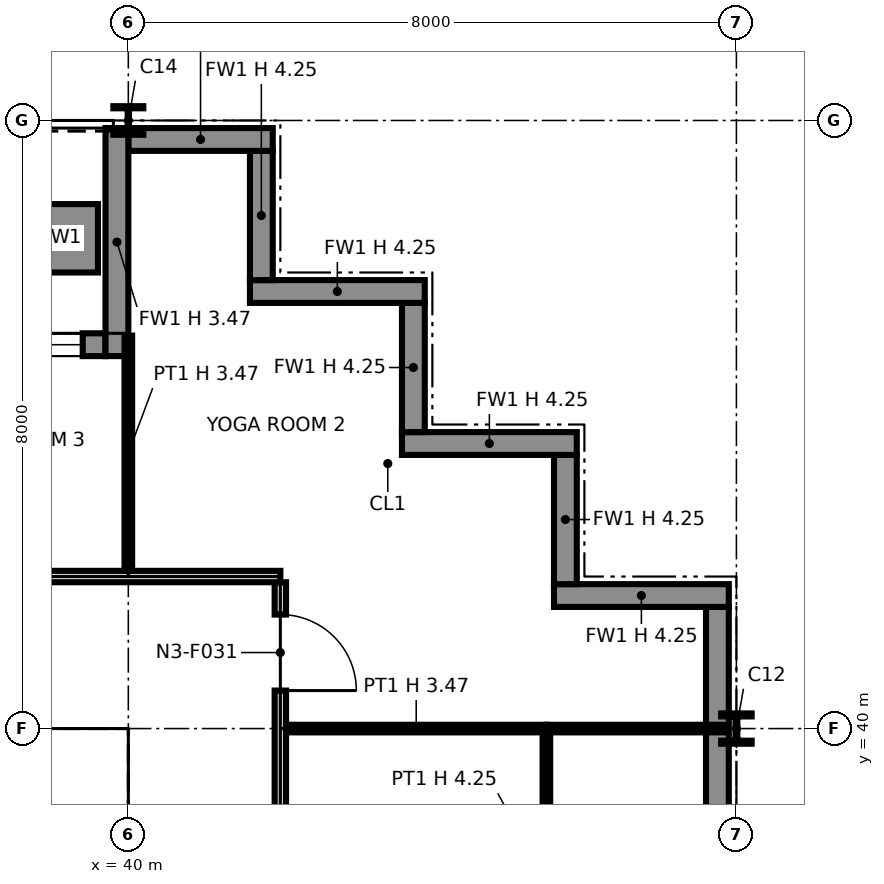
"""IFC4 building model, lengths in metres.
Left out: names, types, materials, properties, quantities, classifications, styles, units other than length and angle.
Written with IfcOpenShell. Run it as: python <this file> out.ifc"""

import sys

from ifc_helpers import new_model, si_unit, direction, frame, frame_2d, origin, origin_2d, place, context, subcontext, project, spatial, polyline, rectangle, i_section, outline, extrude, element, fill, save


model = new_model("IFC4")
c1 = context("Model", 3, precision=1e-05, world=origin(), true_north=direction((0.0, 1.0)))
c2 = subcontext(c1, "Body", "Model", "MODEL_VIEW")
j1 = project(units=[si_unit("LENGTHUNIT", "METRE"), si_unit("PLANEANGLEUNIT", "RADIAN")], contexts=[c1])
p1 = place(None, origin())
s1 = spatial("IfcSite", under=j1, at=p1, CompositionType="ELEMENT")
p2 = place(p1, origin())
s2 = spatial("IfcBuilding", under=s1, at=p2, CompositionType="ELEMENT")
p3 = place(p2, frame((0.0, 0.0, 65.6)))
s3 = spatial("IfcBuildingStorey", under=s2, at=p3, CompositionType="ELEMENT", Elevation=65.6)
p4 = place(p3, frame((40.0, 40.0, 0.0), z_axis=(0.0, 0.0, 1.0), x_axis=(1.0, 0.0, 0.0)))
e1 = element("IfcColumn", 1, at=p4, inside=s3, PredefinedType="COLUMN", context=c2, shape_type="SweptSolid", body=[
    extrude(i_section(OverallWidth=0.371, OverallDepth=0.361, WebThickness=0.012, FlangeThickness=0.02, at=origin_2d()), origin(), (0.0, 0.0, 1.0), 4.25),
])
p5 = place(p3, frame((40.0, 48.0, 0.0), z_axis=(0.0, 0.0, 1.0), x_axis=(1.0, 0.0, 0.0)))
e2 = element("IfcColumn", 2, at=p5, inside=s3, PredefinedType="COLUMN", context=c2, shape_type="SweptSolid", body=[
    extrude(i_section(OverallWidth=0.394, OverallDepth=0.376, WebThickness=0.017, FlangeThickness=0.028, at=origin_2d()), origin(), (0.0, 0.0, 1.0), 4.25),
])
p6 = place(p3, frame((48.0, 40.0, 0.0), z_axis=(0.0, 0.0, 1.0), x_axis=(1.0, 0.0, 0.0)))
e3 = element("IfcColumn", 3, at=p6, inside=s3, PredefinedType="COLUMN", context=c2, shape_type="SweptSolid", body=[
    extrude(i_section(OverallWidth=0.401, OverallDepth=0.399, WebThickness=0.025, FlangeThickness=0.04, at=origin_2d()), origin(), (0.0, 0.0, 1.0), 4.25),
])
p7 = place(p3, frame((47.75, 32.0, 0.0), z_axis=(0.0, 0.0, 1.0), x_axis=(0.0, 1.0, 0.0)))
e4 = element("IfcWall", 4, at=p7, inside=s3, PredefinedType="SOLIDWALL", context=c2, shape_type="SweptSolid", body=[
    extrude(rectangle(XDim=9.6, YDim=0.3, at=frame_2d((4.8, 0.0))), origin(), (0.0, 0.0, 1.0), 4.25),
])
p8 = place(p3, frame((47.9, 41.75, 0.0), z_axis=(0.0, 0.0, 1.0), x_axis=(-1.0, 0.0, 0.0)))
e5 = element("IfcWall", 5, at=p8, inside=s3, PredefinedType="SOLIDWALL", context=c2, shape_type="SweptSolid", body=[
    extrude(rectangle(XDim=2.3, YDim=0.3, at=frame_2d((1.15, 0.0))), origin(), (0.0, 0.0, 1.0), 4.25),
])
p9 = place(p3, frame((45.75, 41.9, 0.0), z_axis=(0.0, 0.0, 1.0), x_axis=(0.0, 1.0, 0.0)))
e6 = element("IfcWall", 6, at=p9, inside=s3, PredefinedType="SOLIDWALL", context=c2, shape_type="SweptSolid", body=[
    extrude(rectangle(XDim=1.7, YDim=0.3, at=frame_2d((0.85, 0.0))), origin(), (0.0, 0.0, 1.0), 4.25),
])
p10 = place(p3, frame((45.9, 43.75, 0.0), z_axis=(0.0, 0.0, 1.0), x_axis=(-1.0, 0.0, 0.0)))
e7 = element("IfcWall", 7, at=p10, inside=s3, PredefinedType="SOLIDWALL", context=c2, shape_type="SweptSolid", body=[
    extrude(rectangle(XDim=2.3, YDim=0.3, at=frame_2d((1.15, 0.0))), origin(), (0.0, 0.0, 1.0), 4.25),
])
p11 = place(p3, frame((43.75, 43.9, 0.0), z_axis=(0.0, 0.0, 1.0), x_axis=(0.0, 1.0, 0.0)))
e8 = element("IfcWall", 8, at=p11, inside=s3, PredefinedType="SOLIDWALL", context=c2, shape_type="SweptSolid", body=[
    extrude(rectangle(XDim=1.7, YDim=0.3, at=frame_2d((0.85, 0.0))), origin(), (0.0, 0.0, 1.0), 4.25),
])
p12 = place(p3, frame((43.9, 45.75, 0.0), z_axis=(0.0, 0.0, 1.0), x_axis=(-1.0, 0.0, 0.0)))
e9 = element("IfcWall", 9, at=p12, inside=s3, PredefinedType="SOLIDWALL", context=c2, shape_type="SweptSolid", body=[
    extrude(rectangle(XDim=2.3, YDim=0.3, at=frame_2d((1.15, 0.0))), origin(), (0.0, 0.0, 1.0), 4.25),
])
p13 = place(p3, frame((41.75, 45.9, 0.0), z_axis=(0.0, 0.0, 1.0), x_axis=(0.0, 1.0, 0.0)))
e10 = element("IfcWall", 10, at=p13, inside=s3, PredefinedType="SOLIDWALL", context=c2, shape_type="SweptSolid", body=[
    extrude(rectangle(XDim=1.7, YDim=0.3, at=frame_2d((0.85, 0.0))), origin(), (0.0, 0.0, 1.0), 4.25),
])
p14 = place(p3, frame((41.9, 47.75, 0.0), z_axis=(0.0, 0.0, 1.0), x_axis=(-1.0, 0.0, 0.0)))
e11 = element("IfcWall", 11, at=p14, inside=s3, PredefinedType="SOLIDWALL", context=c2, shape_type="SweptSolid", body=[
    extrude(rectangle(XDim=1.9, YDim=0.3, at=frame_2d((0.95, 0.0))), origin(), (0.0, 0.0, 1.0), 4.25),
])
p15 = place(p3, frame((39.7, 45.05, 0.0), z_axis=(0.0, 0.0, 1.0), x_axis=(-1.0, 0.0, 0.0)))
e12 = element("IfcWall", 12, at=p15, inside=s3, PredefinedType="SOLIDWALL", context=c2, shape_type="SweptSolid", body=[
    extrude(rectangle(XDim=7.4, YDim=0.3, at=frame_2d((3.7, 0.0))), origin(), (0.0, 0.0, 1.0), 4.25),
])
p16 = place(p15, frame((0.3, 0.0, 0.9)))
e13 = element("IfcOpeningElement", 13, at=p16, cuts=e12, PredefinedType="OPENING", context=c2, shape_type="SweptSolid", body=[
    extrude(rectangle(XDim=2.8, YDim=2.2, at=frame_2d((1.4, 1.1))), frame((0.0, 0.16, 0.0), z_axis=(0.0, -1.0, 0.0), x_axis=(1.0, 0.0, 0.0)), (0.0, 0.0, 1.0), 0.32),
])
p17 = place(p15, frame((4.7, 0.0, 0.0)))
e14 = element("IfcOpeningElement", 14, at=p17, cuts=e12, PredefinedType="OPENING", context=c2, shape_type="SweptSolid", body=[
    extrude(rectangle(XDim=2.0, YDim=2.4, at=frame_2d((1.0, 1.2))), frame((0.0, 0.16, 0.0), z_axis=(0.0, -1.0, 0.0), x_axis=(1.0, 0.0, 0.0)), (0.0, 0.0, 1.0), 0.32),
])
p18 = place(p3, frame((39.85, 47.9, 0.0), z_axis=(0.0, 0.0, 1.0), x_axis=(0.0, -1.0, 0.0)))
e15 = element("IfcWall", 15, at=p18, inside=s3, PredefinedType="SOLIDWALL", context=c2, shape_type="SweptSolid", body=[
    extrude(rectangle(XDim=3.0, YDim=0.3, at=frame_2d((1.5, 0.0))), origin(), (0.0, 0.0, 1.0), 3.469),
])
p19 = place(p3, frame((39.6, 46.45, 0.0), z_axis=(0.0, 0.0, 1.0), x_axis=(-1.0, 0.0, 0.0)))
e16 = element("IfcWall", 16, at=p19, inside=s3, PredefinedType="SOLIDWALL", context=c2, shape_type="SweptSolid", body=[
    extrude(rectangle(XDim=3.2, YDim=0.9, at=frame_2d((1.6, 0.0))), origin(), (0.0, 0.0, 1.0), 0.6),
])
p20 = place(p3, frame((24.65, 39.25, 0.0), z_axis=(0.0, 0.0, 1.0), x_axis=(1.0, 0.0, 0.0)))
e17 = element("IfcWall", 17, at=p20, inside=s3, PredefinedType="PARTITIONING", context=c2, shape_type="SweptSolid", body=[
    extrude(outline(polyline([(0.0, 0.0), (14.7, 0.0), (14.7, 4.25), (7.469, 4.25), (7.469, 3.632), (7.231, 3.632), (7.23, 4.25), (0.0, 4.25), (0.0, 0.0)])), frame((0.0, 0.1, 0.0), z_axis=(0.0, -1.0, 0.0), x_axis=(1.0, 0.0, 0.0)), (0.0, 0.0, 1.0), 0.2),
])
p21 = place(p3, frame((39.25, 32.85, 0.0), z_axis=(0.0, 0.0, 1.0), x_axis=(0.0, 1.0, 0.0)))
e18 = element("IfcWall", 18, at=p21, inside=s3, PredefinedType="PARTITIONING", context=c2, shape_type="SweptSolid", body=[
    extrude(rectangle(XDim=6.3, YDim=0.2, at=frame_2d((3.15, 0.0))), origin(), (0.0, 0.0, 1.0), 4.25),
])
p22 = place(p3, frame((42.0, 16.0, 0.0), z_axis=(0.0, 0.0, 1.0), x_axis=(0.0, 1.0, 0.0)))
e19 = element("IfcWall", 19, at=p22, inside=s3, PredefinedType="PARTITIONING", context=c2, shape_type="SweptSolid", body=[
    extrude(outline(polyline([(0.0, 0.0), (25.925, 0.0), (25.925, 4.25), (24.3, 4.25), (24.298, 3.47), (23.702, 3.47), (23.7, 4.25), (20.3, 4.25), (20.298, 3.47), (19.702, 3.47), (19.7, 4.25), (16.3, 4.25), (16.298, 3.47), (15.702, 3.47), (15.7, 4.25), (12.3, 4.25), (12.298, 3.47), (11.702, 3.47), (11.7, 4.25), (8.3, 4.25), (8.298, 3.47), (7.702, 3.47), (7.7, 4.25), (4.3, 4.25), (4.298, 3.47), (3.702, 3.47), (3.7, 4.25), (0.0, 4.25), (0.0, 0.0)])), frame((0.0, 0.075, 0.0), z_axis=(0.0, -1.0, 0.0), x_axis=(1.0, 0.0, 0.0)), (0.0, 0.0, 1.0), 0.15),
])
p23 = place(p22, frame((2.5, 0.0, 0.0), z_axis=(0.0, 0.0, 1.0), x_axis=(-1.0, 0.0, 0.0)))
e20 = element("IfcOpeningElement", 20, at=p23, cuts=e19, PredefinedType="OPENING", context=c2, shape_type="SweptSolid", body=[
    extrude(rectangle(XDim=1.0, YDim=2.1, at=frame_2d((0.5, 1.05))), frame((0.0, 0.085, 0.0), z_axis=(0.0, -1.0, 0.0), x_axis=(1.0, 0.0, 0.0)), (0.0, 0.0, 1.0), 0.17),
])
p24 = place(p22, frame((6.5, 0.0, 0.0), z_axis=(0.0, 0.0, 1.0), x_axis=(-1.0, 0.0, 0.0)))
e21 = element("IfcOpeningElement", 21, at=p24, cuts=e19, PredefinedType="OPENING", context=c2, shape_type="SweptSolid", body=[
    extrude(rectangle(XDim=1.0, YDim=2.1, at=frame_2d((0.5, 1.05))), frame((0.0, 0.085, 0.0), z_axis=(0.0, -1.0, 0.0), x_axis=(1.0, 0.0, 0.0)), (0.0, 0.0, 1.0), 0.17),
])
p25 = place(p22, frame((9.3, 0.0, 0.0), z_axis=(0.0, 0.0, 1.0), x_axis=(-1.0, 0.0, 0.0)))
e22 = element("IfcOpeningElement", 22, at=p25, cuts=e19, PredefinedType="OPENING", context=c2, shape_type="SweptSolid", body=[
    extrude(rectangle(XDim=1.0, YDim=2.1, at=frame_2d((0.5, 1.05))), frame((0.0, 0.085, 0.0), z_axis=(0.0, -1.0, 0.0), x_axis=(1.0, 0.0, 0.0)), (0.0, 0.0, 1.0), 0.17),
])
p26 = place(p22, frame((14.5, 0.0, 0.0), z_axis=(0.0, 0.0, 1.0), x_axis=(-1.0, 0.0, 0.0)))
e23 = element("IfcOpeningElement", 23, at=p26, cuts=e19, PredefinedType="OPENING", context=c2, shape_type="SweptSolid", body=[
    extrude(rectangle(XDim=1.0, YDim=2.1, at=frame_2d((0.5, 1.05))), frame((0.0, 0.085, 0.0), z_axis=(0.0, -1.0, 0.0), x_axis=(1.0, 0.0, 0.0)), (0.0, 0.0, 1.0), 0.17),
])
p27 = place(p22, frame((18.5, 0.0, 0.0), z_axis=(0.0, 0.0, 1.0), x_axis=(-1.0, 0.0, 0.0)))
e24 = element("IfcOpeningElement", 24, at=p27, cuts=e19, PredefinedType="OPENING", context=c2, shape_type="SweptSolid", body=[
    extrude(rectangle(XDim=1.0, YDim=2.1, at=frame_2d((0.5, 1.05))), frame((0.0, 0.085, 0.0), z_axis=(0.0, -1.0, 0.0), x_axis=(1.0, 0.0, 0.0)), (0.0, 0.0, 1.0), 0.17),
])
p28 = place(p22, frame((22.5, 0.0, 0.0), z_axis=(0.0, 0.0, 1.0), x_axis=(-1.0, 0.0, 0.0)))
e25 = element("IfcOpeningElement", 25, at=p28, cuts=e19, PredefinedType="OPENING", context=c2, shape_type="SweptSolid", body=[
    extrude(rectangle(XDim=1.0, YDim=2.1, at=frame_2d((0.5, 1.05))), frame((0.0, 0.085, 0.0), z_axis=(0.0, -1.0, 0.0), x_axis=(1.0, 0.0, 0.0)), (0.0, 0.0, 1.0), 0.17),
])
p29 = place(p22, frame((25.5, 0.0, 0.0), z_axis=(0.0, 0.0, 1.0), x_axis=(-1.0, 0.0, 0.0)))
e26 = element("IfcOpeningElement", 26, at=p29, cuts=e19, PredefinedType="OPENING", context=c2, shape_type="SweptSolid", body=[
    extrude(rectangle(XDim=1.0, YDim=2.1, at=frame_2d((0.5, 1.05))), frame((0.0, 0.085, 0.0), z_axis=(0.0, -1.0, 0.0), x_axis=(1.0, 0.0, 0.0)), (0.0, 0.0, 1.0), 0.17),
])
p30 = place(p3, frame((45.5, 36.0, 0.0), z_axis=(0.0, 0.0, 1.0), x_axis=(0.0, 1.0, 0.0)))
e27 = element("IfcWall", 27, at=p30, inside=s3, PredefinedType="PARTITIONING", context=c2, shape_type="SweptSolid", body=[
    extrude(rectangle(XDim=3.95, YDim=0.1, at=frame_2d((1.975, 0.0))), origin(), (0.0, 0.0, 1.0), 4.25),
])
p31 = place(p30, frame((2.5, 0.0, 0.0), z_axis=(0.0, 0.0, 1.0), x_axis=(-1.0, 0.0, 0.0)))
e28 = element("IfcOpeningElement", 28, at=p31, cuts=e27, PredefinedType="OPENING", context=c2, shape_type="SweptSolid", body=[
    extrude(rectangle(XDim=1.0, YDim=2.1, at=frame_2d((0.5, 1.05))), frame((0.0, 0.06, 0.0), z_axis=(0.0, -1.0, 0.0), x_axis=(1.0, 0.0, 0.0)), (0.0, 0.0, 1.0), 0.12),
])
p32 = place(p3, frame((42.075, 40.0, 0.0), z_axis=(0.0, 0.0, 1.0), x_axis=(1.0, 0.0, 0.0)))
e29 = element("IfcWall", 29, at=p32, inside=s3, PredefinedType="PARTITIONING", context=c2, shape_type="SweptSolid", body=[
    extrude(rectangle(XDim=3.425, YDim=0.1, at=frame_2d((1.712, 0.0))), origin(), (0.0, 0.0, 1.0), 3.47),
])
p33 = place(p3, frame((45.5, 40.0, 0.0), z_axis=(0.0, 0.0, 1.0), x_axis=(1.0, 0.0, 0.0)))
e30 = element("IfcWall", 30, at=p33, inside=s3, PredefinedType="PARTITIONING", context=c2, shape_type="SweptSolid", body=[
    extrude(rectangle(XDim=2.37, YDim=0.1, at=frame_2d((1.185, 0.0))), origin(), (0.0, 0.0, 1.0), 3.47),
])
p34 = place(p3, frame((8.05, 42.0, 0.0), z_axis=(0.0, 0.0, 1.0), x_axis=(1.0, 0.0, 0.0)))
e31 = element("IfcWall", 31, at=p34, inside=s3, PredefinedType="PARTITIONING", context=c2, shape_type="SweptSolid", body=[
    extrude(rectangle(XDim=33.95, YDim=0.15, at=frame_2d((16.975, 0.0))), origin(), (0.0, 0.0, 1.0), 4.25),
])
p35 = place(p34, frame((9.45, 0.0, 0.0)))
e32 = element("IfcOpeningElement", 32, at=p35, cuts=e31, PredefinedType="OPENING", context=c2, shape_type="SweptSolid", body=[
    extrude(rectangle(XDim=1.0, YDim=2.1, at=frame_2d((0.5, 1.05))), frame((0.0, 0.085, 0.0), z_axis=(0.0, -1.0, 0.0), x_axis=(1.0, 0.0, 0.0)), (0.0, 0.0, 1.0), 0.17),
])
p36 = place(p34, frame((13.45, 0.0, 0.0)))
e33 = element("IfcOpeningElement", 33, at=p36, cuts=e31, PredefinedType="OPENING", context=c2, shape_type="SweptSolid", body=[
    extrude(rectangle(XDim=1.0, YDim=2.1, at=frame_2d((0.5, 1.05))), frame((0.0, 0.085, 0.0), z_axis=(0.0, -1.0, 0.0), x_axis=(1.0, 0.0, 0.0)), (0.0, 0.0, 1.0), 0.17),
])
p37 = place(p34, frame((27.45, 0.0, 0.0)))
e34 = element("IfcOpeningElement", 34, at=p37, cuts=e31, PredefinedType="OPENING", context=c2, shape_type="SweptSolid", body=[
    extrude(rectangle(XDim=1.0, YDim=2.1, at=frame_2d((0.5, 1.05))), frame((0.0, 0.085, 0.0), z_axis=(0.0, -1.0, 0.0), x_axis=(1.0, 0.0, 0.0)), (0.0, 0.0, 1.0), 0.17),
])
p38 = place(p34, frame((1.45, 0.0, 0.0)))
e35 = element("IfcOpeningElement", 35, at=p38, cuts=e31, PredefinedType="OPENING", context=c2, shape_type="SweptSolid", body=[
    extrude(rectangle(XDim=1.0, YDim=2.1, at=frame_2d((0.5, 1.05))), frame((0.0, 0.085, 0.0), z_axis=(0.0, -1.0, 0.0), x_axis=(1.0, 0.0, 0.0)), (0.0, 0.0, 1.0), 0.17),
])
p39 = place(p34, frame((5.45, 0.0, 0.0)))
e36 = element("IfcOpeningElement", 36, at=p39, cuts=e31, PredefinedType="OPENING", context=c2, shape_type="SweptSolid", body=[
    extrude(rectangle(XDim=1.0, YDim=2.1, at=frame_2d((0.5, 1.05))), frame((0.0, 0.085, 0.0), z_axis=(0.0, -1.0, 0.0), x_axis=(1.0, 0.0, 0.0)), (0.0, 0.0, 1.0), 0.17),
])
p40 = place(p34, frame((17.45, 0.0, 0.0)))
e37 = element("IfcOpeningElement", 37, at=p40, cuts=e31, PredefinedType="OPENING", context=c2, shape_type="SweptSolid", body=[
    extrude(rectangle(XDim=1.0, YDim=2.1, at=frame_2d((0.5, 1.05))), frame((0.0, 0.085, 0.0), z_axis=(0.0, -1.0, 0.0), x_axis=(1.0, 0.0, 0.0)), (0.0, 0.0, 1.0), 0.17),
])
p41 = place(p34, frame((21.45, 0.0, 0.0)))
e38 = element("IfcOpeningElement", 38, at=p41, cuts=e31, PredefinedType="OPENING", context=c2, shape_type="SweptSolid", body=[
    extrude(rectangle(XDim=1.0, YDim=2.1, at=frame_2d((0.5, 1.05))), frame((0.0, 0.085, 0.0), z_axis=(0.0, -1.0, 0.0), x_axis=(1.0, 0.0, 0.0)), (0.0, 0.0, 1.0), 0.17),
])
p42 = place(p3, frame((40.0, 42.075, 0.0), z_axis=(0.0, 0.0, 1.0), x_axis=(0.0, 1.0, 0.0)))
e39 = element("IfcWall", 39, at=p42, inside=s3, PredefinedType="PARTITIONING", context=c2, shape_type="SweptSolid", body=[
    extrude(rectangle(XDim=3.095, YDim=0.1, at=frame_2d((1.547, 0.0))), origin(), (0.0, 0.0, 1.0), 3.47),
])
p43 = place(p16, origin())
e40 = element("IfcWindow", 40, at=p43, inside=s3, PartitioningType="SINGLE_PANEL", PredefinedType="WINDOW", context=c2, shape_type="SweptSolid", body=[
    extrude(rectangle(XDim=2.8, YDim=2.2, at=frame_2d((1.4, 1.1))), frame((0.0, 0.03, 0.0), z_axis=(0.0, -1.0, 0.0), x_axis=(1.0, 0.0, 0.0)), (0.0, 0.0, 1.0), 0.06),
])
fill(e13, e40)
p44 = place(p29, origin())
e41 = element("IfcDoor", 41, at=p44, inside=s3, OperationType="SINGLE_SWING_RIGHT", PredefinedType="DOOR", context=c2, shape_type="SweptSolid", body=[
    extrude(rectangle(XDim=1.0, YDim=2.1, at=frame_2d((0.5, 1.05))), frame((0.0, 0.025, 0.0), z_axis=(0.0, -1.0, 0.0), x_axis=(1.0, 0.0, 0.0)), (0.0, 0.0, 1.0), 0.05),
])
fill(e26, e41)
save(model, sys.argv[1])
